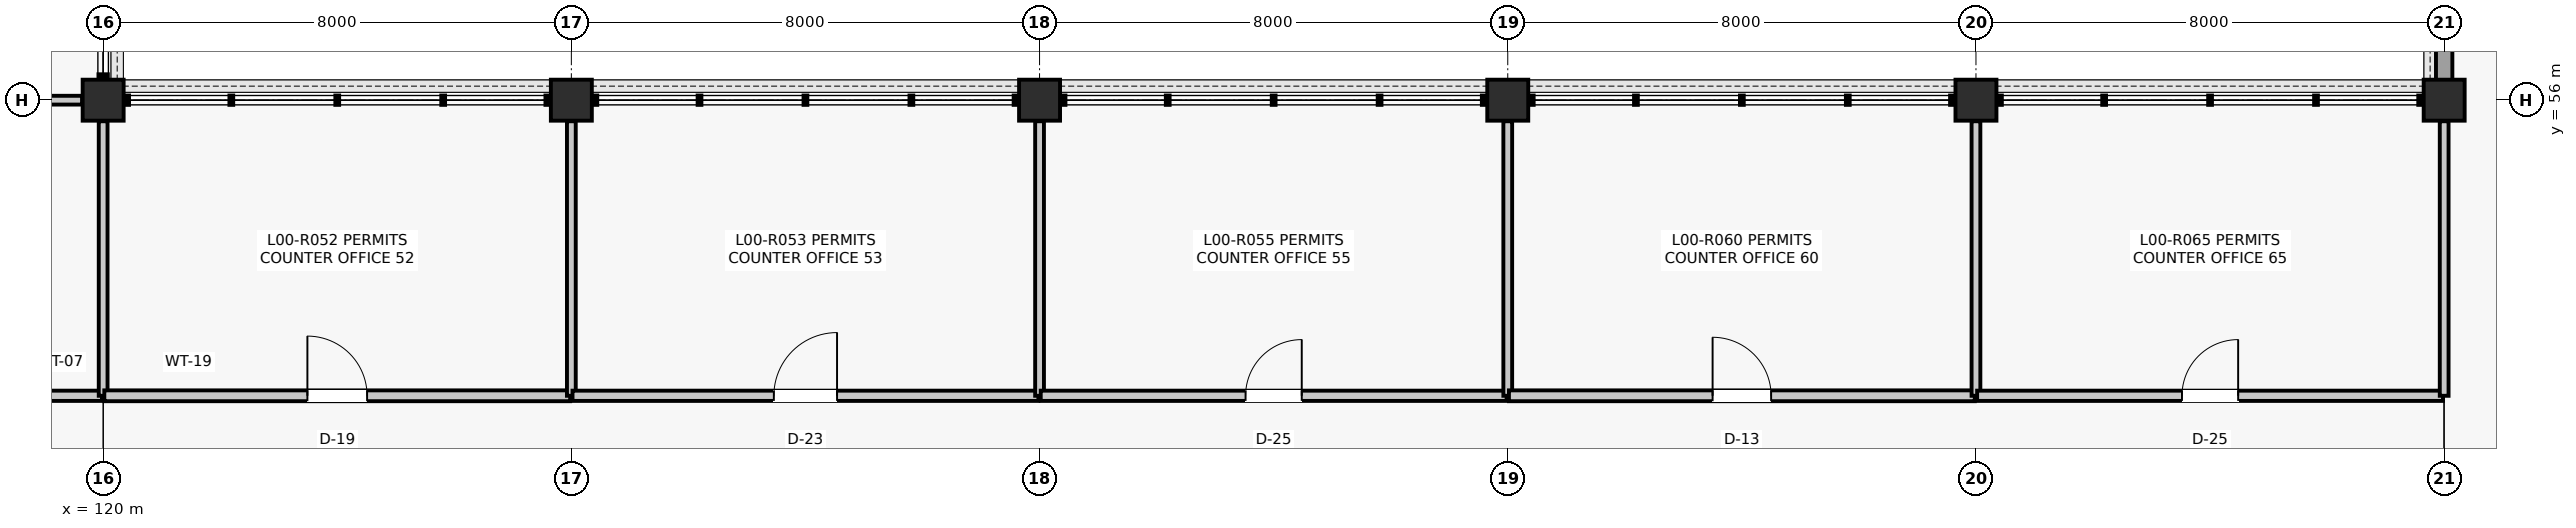
"""IFC4 building model, lengths in metres.
Left out: names, types, materials, properties, quantities, classifications, styles, units other than length and angle.
Written with IfcOpenShell. Run it as: python <this file> out.ifc"""

import sys

from ifc_helpers import new_model, si_unit, direction, frame, frame_2d, origin, origin_2d, place, context, subcontext, project, spatial, rectangle, extrude, element, fill, save


model = new_model("IFC4")
c1 = context("Model", 3, precision=1e-05, world=origin(), true_north=direction((0.0, 1.0)))
c2 = subcontext(c1, "Body", "Model", "MODEL_VIEW")
j1 = project(units=[si_unit("LENGTHUNIT", "METRE"), si_unit("PLANEANGLEUNIT", "RADIAN")], contexts=[c1])
p1 = place(None, origin())
s1 = spatial("IfcSite", under=j1, at=p1, CompositionType="ELEMENT")
p2 = place(p1, origin())
s2 = spatial("IfcBuilding", under=s1, at=p2, CompositionType="ELEMENT")
p3 = place(p2, origin())
s3 = spatial("IfcBuildingStorey", under=s2, at=p3, CompositionType="ELEMENT", Elevation=0.0)
for number, where, z_axis, x_axis in (
    (1, (120.0, 56.0, 0.0), (0.0, 0.0, 1.0), (1.0, 0.0, 0.0)),
    (2, (128.0, 56.0, 0.0), (0.0, 0.0, 1.0), (1.0, 0.0, 0.0)),
    (3, (136.0, 56.0, 0.0), (0.0, 0.0, 1.0), (1.0, 0.0, 0.0)),
    (4, (144.0, 56.0, 0.0), (0.0, 0.0, 1.0), (1.0, 0.0, 0.0)),
    (5, (152.0, 56.0, 0.0), (0.0, 0.0, 1.0), (1.0, 0.0, 0.0)),
    (6, (160.0, 56.0, 0.0), (0.0, 0.0, 1.0), (1.0, 0.0, 0.0)),
):
    element("IfcColumn", number, at=place(p3, frame(where, z_axis=z_axis, x_axis=x_axis)), inside=s3, PredefinedType="COLUMN", context=c2, shape_type="SweptSolid", body=[
        extrude(rectangle(XDim=0.7, YDim=0.7, at=origin_2d()), origin(), (0.0, 0.0, 1.0), 5.28),
    ])
p4 = place(p3, frame((160.0, 56.335, 0.0), z_axis=(0.0, 0.0, 1.0), x_axis=(0.0, 1.0, 0.0)))
e7 = element("IfcWall", 7, at=p4, inside=s3, PredefinedType="SOLIDWALL", context=c2, shape_type="SweptSolid", body=[
    extrude(rectangle(XDim=7.33, YDim=0.28, at=frame_2d((3.665, 0.0))), origin(), (0.0, 0.0, 1.0), 4.682),
])
p5 = place(p4, frame((0.644, 0.0, 0.95)))
e8 = element("IfcOpeningElement", 8, at=p5, cuts=e7, PredefinedType="OPENING", context=c2, shape_type="SweptSolid", body=[
    extrude(rectangle(XDim=1.35, YDim=1.9, at=frame_2d((0.675, 0.95))), frame((0.0, 0.15, 0.0), z_axis=(0.0, -1.0, 0.0), x_axis=(1.0, 0.0, 0.0)), (0.0, 0.0, 1.0), 0.3),
])
p6 = place(p4, frame((5.336, 0.0, 0.95)))
e9 = element("IfcOpeningElement", 9, at=p6, cuts=e7, PredefinedType="OPENING", context=c2, shape_type="SweptSolid", body=[
    extrude(rectangle(XDim=1.35, YDim=1.9, at=frame_2d((0.675, 0.95))), frame((0.0, 0.15, 0.0), z_axis=(0.0, -1.0, 0.0), x_axis=(1.0, 0.0, 0.0)), (0.0, 0.0, 1.0), 0.3),
])
p7 = place(p3, frame((114.9, 50.95, 0.0), z_axis=(0.0, 0.0, 1.0), x_axis=(1.0, 0.0, 0.0)))
e10 = element("IfcWall", 10, at=p7, inside=s3, PredefinedType="PARTITIONING", context=c2, shape_type="SweptSolid", body=[
    extrude(rectangle(XDim=5.08, YDim=0.175, at=frame_2d((2.54, 0.0))), origin(), (0.0, 0.0, 1.0), 4.412),
])
p8 = place(p7, frame((2.015, 0.0, 0.0)))
e11 = element("IfcOpeningElement", 11, at=p8, cuts=e10, PredefinedType="OPENING", context=c2, shape_type="SweptSolid", body=[
    extrude(rectangle(XDim=1.05, YDim=2.15, at=frame_2d((0.525, 1.075))), frame((0.0, 0.097, 0.0), z_axis=(0.0, -1.0, 0.0), x_axis=(1.0, 0.0, 0.0)), (0.0, 0.0, 1.0), 0.195),
])
p9 = place(p3, frame((114.95, 56.0, 0.0), z_axis=(0.0, 0.0, 1.0), x_axis=(1.0, 0.0, 0.0)))
e12 = element("IfcWall", 12, at=p9, inside=s3, PredefinedType="PARTITIONING", context=c2, shape_type="SweptSolid", body=[
    extrude(rectangle(XDim=4.69, YDim=0.15, at=frame_2d((2.345, 0.0))), origin(), (0.0, 0.0, 1.0), 4.403),
])
p10 = place(p3, frame((120.0, 50.95, 0.0), z_axis=(0.0, 0.0, 1.0), x_axis=(0.0, 1.0, 0.0)))
e13 = element("IfcWall", 13, at=p10, inside=s3, PredefinedType="PARTITIONING", context=c2, shape_type="SweptSolid", body=[
    extrude(rectangle(XDim=4.69, YDim=0.15, at=frame_2d((2.345, 0.0))), origin(), (0.0, 0.0, 1.0), 4.412),
])
p11 = place(p3, frame((120.02, 50.95, 0.0), z_axis=(0.0, 0.0, 1.0), x_axis=(1.0, 0.0, 0.0)))
e14 = element("IfcWall", 14, at=p11, inside=s3, PredefinedType="PARTITIONING", context=c2, shape_type="SweptSolid", body=[
    extrude(rectangle(XDim=7.96, YDim=0.185, at=frame_2d((3.98, 0.0))), origin(), (0.0, 0.0, 1.0), 4.404),
])
p12 = place(p11, frame((3.47, 0.0, 0.0)))
e15 = element("IfcOpeningElement", 15, at=p12, cuts=e14, PredefinedType="OPENING", context=c2, shape_type="SweptSolid", body=[
    extrude(rectangle(XDim=1.02, YDim=2.2, at=frame_2d((0.51, 1.1))), frame((0.0, 0.103, 0.0), z_axis=(0.0, -1.0, 0.0), x_axis=(1.0, 0.0, 0.0)), (0.0, 0.0, 1.0), 0.205),
])
p13 = place(p3, frame((128.0, 50.95, 0.0), z_axis=(0.0, 0.0, 1.0), x_axis=(0.0, 1.0, 0.0)))
e16 = element("IfcWall", 16, at=p13, inside=s3, PredefinedType="PARTITIONING", context=c2, shape_type="SweptSolid", body=[
    extrude(rectangle(XDim=4.69, YDim=0.15, at=frame_2d((2.345, 0.0))), origin(), (0.0, 0.0, 1.0), 4.404),
])
p14 = place(p3, frame((128.02, 50.95, 0.0), z_axis=(0.0, 0.0, 1.0), x_axis=(1.0, 0.0, 0.0)))
e17 = element("IfcWall", 17, at=p14, inside=s3, PredefinedType="PARTITIONING", context=c2, shape_type="SweptSolid", body=[
    extrude(rectangle(XDim=7.96, YDim=0.175, at=frame_2d((3.98, 0.0))), origin(), (0.0, 0.0, 1.0), 4.404),
])
p15 = place(p14, frame((3.44, 0.0, 0.0)))
e18 = element("IfcOpeningElement", 18, at=p15, cuts=e17, PredefinedType="OPENING", context=c2, shape_type="SweptSolid", body=[
    extrude(rectangle(XDim=1.08, YDim=2.2, at=frame_2d((0.54, 1.1))), frame((0.0, 0.097, 0.0), z_axis=(0.0, -1.0, 0.0), x_axis=(1.0, 0.0, 0.0)), (0.0, 0.0, 1.0), 0.195),
])
p16 = place(p3, frame((136.0, 50.95, 0.0), z_axis=(0.0, 0.0, 1.0), x_axis=(0.0, 1.0, 0.0)))
e19 = element("IfcWall", 19, at=p16, inside=s3, PredefinedType="PARTITIONING", context=c2, shape_type="SweptSolid", body=[
    extrude(rectangle(XDim=4.69, YDim=0.15, at=frame_2d((2.345, 0.0))), origin(), (0.0, 0.0, 1.0), 4.471),
])
p17 = place(p3, frame((136.02, 50.95, 0.0), z_axis=(0.0, 0.0, 1.0), x_axis=(1.0, 0.0, 0.0)))
e20 = element("IfcWall", 20, at=p17, inside=s3, PredefinedType="PARTITIONING", context=c2, shape_type="SweptSolid", body=[
    extrude(rectangle(XDim=7.96, YDim=0.175, at=frame_2d((3.98, 0.0))), origin(), (0.0, 0.0, 1.0), 4.403),
])
p18 = place(p17, frame((3.5, 0.0, 0.0)))
e21 = element("IfcOpeningElement", 21, at=p18, cuts=e20, PredefinedType="OPENING", context=c2, shape_type="SweptSolid", body=[
    extrude(rectangle(XDim=0.96, YDim=2.14, at=frame_2d((0.48, 1.07))), frame((0.0, 0.097, 0.0), z_axis=(0.0, -1.0, 0.0), x_axis=(1.0, 0.0, 0.0)), (0.0, 0.0, 1.0), 0.195),
])
p19 = place(p3, frame((144.0, 50.95, 0.0), z_axis=(0.0, 0.0, 1.0), x_axis=(0.0, 1.0, 0.0)))
e22 = element("IfcWall", 22, at=p19, inside=s3, PredefinedType="PARTITIONING", context=c2, shape_type="SweptSolid", body=[
    extrude(rectangle(XDim=4.69, YDim=0.15, at=frame_2d((2.345, 0.0))), origin(), (0.0, 0.0, 1.0), 4.403),
])
p20 = place(p3, frame((144.02, 50.95, 0.0), z_axis=(0.0, 0.0, 1.0), x_axis=(1.0, 0.0, 0.0)))
e23 = element("IfcWall", 23, at=p20, inside=s3, PredefinedType="PARTITIONING", context=c2, shape_type="SweptSolid", body=[
    extrude(rectangle(XDim=7.96, YDim=0.185, at=frame_2d((3.98, 0.0))), origin(), (0.0, 0.0, 1.0), 4.403),
])
p21 = place(p20, frame((3.48, 0.0, 0.0)))
e24 = element("IfcOpeningElement", 24, at=p21, cuts=e23, PredefinedType="OPENING", context=c2, shape_type="SweptSolid", body=[
    extrude(rectangle(XDim=1.0, YDim=2.15, at=frame_2d((0.5, 1.075))), frame((0.0, 0.103, 0.0), z_axis=(0.0, -1.0, 0.0), x_axis=(1.0, 0.0, 0.0)), (0.0, 0.0, 1.0), 0.205),
])
p22 = place(p3, frame((152.0, 50.95, 0.0), z_axis=(0.0, 0.0, 1.0), x_axis=(0.0, 1.0, 0.0)))
e25 = element("IfcWall", 25, at=p22, inside=s3, PredefinedType="PARTITIONING", context=c2, shape_type="SweptSolid", body=[
    extrude(rectangle(XDim=4.69, YDim=0.15, at=frame_2d((2.345, 0.0))), origin(), (0.0, 0.0, 1.0), 4.412),
])
p23 = place(p3, frame((152.02, 50.95, 0.0), z_axis=(0.0, 0.0, 1.0), x_axis=(1.0, 0.0, 0.0)))
e26 = element("IfcWall", 26, at=p23, inside=s3, PredefinedType="PARTITIONING", context=c2, shape_type="SweptSolid", body=[
    extrude(rectangle(XDim=7.96, YDim=0.175, at=frame_2d((3.98, 0.0))), origin(), (0.0, 0.0, 1.0), 4.404),
])
p24 = place(p23, frame((3.5, 0.0, 0.0)))
e27 = element("IfcOpeningElement", 27, at=p24, cuts=e26, PredefinedType="OPENING", context=c2, shape_type="SweptSolid", body=[
    extrude(rectangle(XDim=0.96, YDim=2.14, at=frame_2d((0.48, 1.07))), frame((0.0, 0.097, 0.0), z_axis=(0.0, -1.0, 0.0), x_axis=(1.0, 0.0, 0.0)), (0.0, 0.0, 1.0), 0.195),
])
p25 = place(p3, frame((160.0, 50.95, 0.0), z_axis=(0.0, 0.0, 1.0), x_axis=(0.0, 1.0, 0.0)))
e28 = element("IfcWall", 28, at=p25, inside=s3, PredefinedType="PARTITIONING", context=c2, shape_type="SweptSolid", body=[
    extrude(rectangle(XDim=4.69, YDim=0.15, at=frame_2d((2.345, 0.0))), origin(), (0.0, 0.0, 1.0), 4.404),
])
p26 = place(p12, origin())
e29 = element("IfcDoor", 29, at=p26, inside=s3, OperationType="SINGLE_SWING_LEFT", PredefinedType="DOOR", context=c2, shape_type="SweptSolid", body=[
    extrude(rectangle(XDim=1.02, YDim=2.2, at=frame_2d((0.51, 1.1))), frame((0.0, 0.025, 0.0), z_axis=(0.0, -1.0, 0.0), x_axis=(1.0, 0.0, 0.0)), (0.0, 0.0, 1.0), 0.05),
])
fill(e15, e29)
p27 = place(p15, origin())
e30 = element("IfcDoor", 30, at=p27, inside=s3, OperationType="SINGLE_SWING_RIGHT", PredefinedType="DOOR", context=c2, shape_type="SweptSolid", body=[
    extrude(rectangle(XDim=1.08, YDim=2.2, at=frame_2d((0.54, 1.1))), frame((0.0, 0.025, 0.0), z_axis=(0.0, -1.0, 0.0), x_axis=(1.0, 0.0, 0.0)), (0.0, 0.0, 1.0), 0.05),
])
fill(e18, e30)
p28 = place(p18, origin())
e31 = element("IfcDoor", 31, at=p28, inside=s3, OperationType="SINGLE_SWING_RIGHT", PredefinedType="DOOR", context=c2, shape_type="SweptSolid", body=[
    extrude(rectangle(XDim=0.96, YDim=2.14, at=frame_2d((0.48, 1.07))), frame((0.0, 0.025, 0.0), z_axis=(0.0, -1.0, 0.0), x_axis=(1.0, 0.0, 0.0)), (0.0, 0.0, 1.0), 0.05),
])
fill(e21, e31)
p29 = place(p21, origin())
e32 = element("IfcDoor", 32, at=p29, inside=s3, OperationType="SINGLE_SWING_LEFT", PredefinedType="DOOR", context=c2, shape_type="SweptSolid", body=[
    extrude(rectangle(XDim=1.0, YDim=2.15, at=frame_2d((0.5, 1.075))), frame((0.0, 0.025, 0.0), z_axis=(0.0, -1.0, 0.0), x_axis=(1.0, 0.0, 0.0)), (0.0, 0.0, 1.0), 0.05),
])
fill(e24, e32)
p30 = place(p24, origin())
e33 = element("IfcDoor", 33, at=p30, inside=s3, OperationType="SINGLE_SWING_RIGHT", PredefinedType="DOOR", context=c2, shape_type="SweptSolid", body=[
    extrude(rectangle(XDim=0.96, YDim=2.14, at=frame_2d((0.48, 1.07))), frame((0.0, 0.025, 0.0), z_axis=(0.0, -1.0, 0.0), x_axis=(1.0, 0.0, 0.0)), (0.0, 0.0, 1.0), 0.05),
])
fill(e27, e33)
save(model, sys.argv[1])
